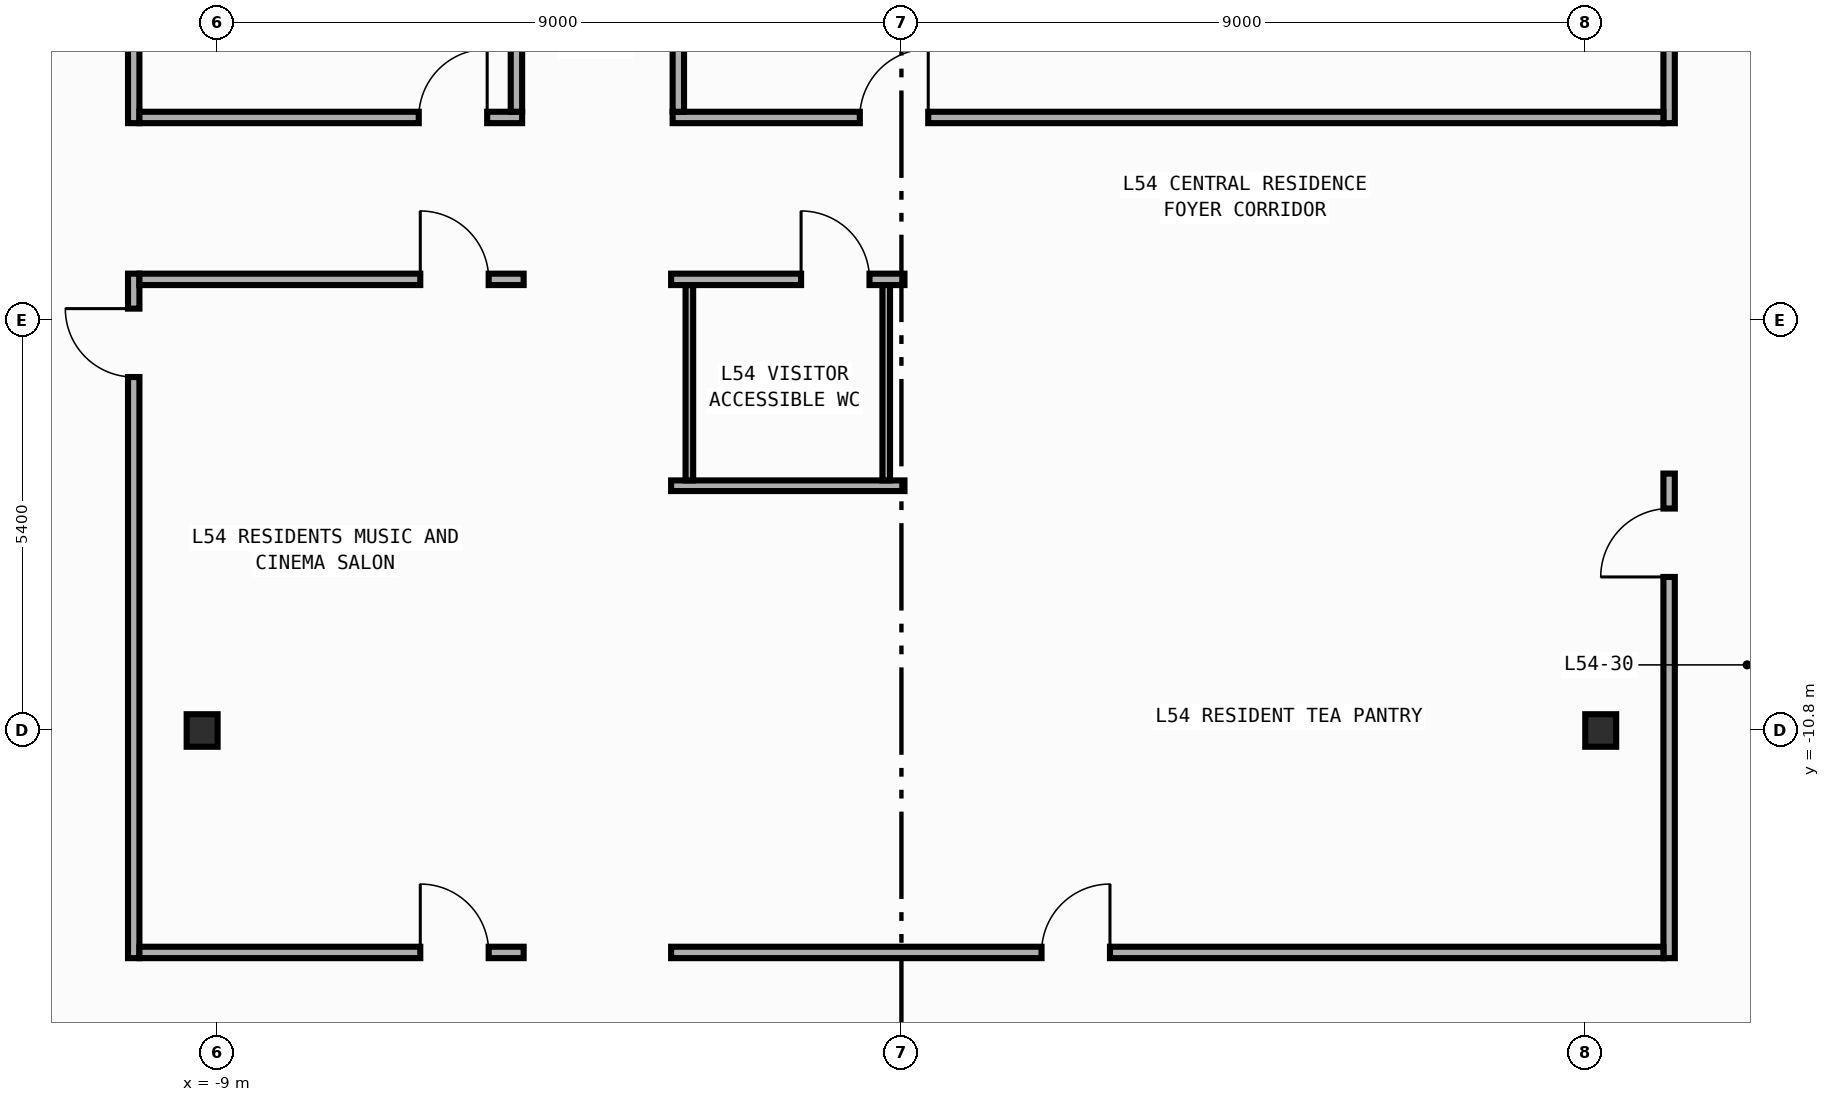
"""IFC4 building model, lengths in metres.
Left out: names, types, materials, properties, quantities, classifications, styles, units other than length and angle.
Written with IfcOpenShell. Run it as: python <this file> out.ifc"""

import sys

from ifc_helpers import new_model, si_unit, direction, frame, frame_2d, origin, origin_2d, place, context, subcontext, project, spatial, rectangle, i_section, extrude, element, fill, save


model = new_model("IFC4")
c1 = context("Model", 3, precision=1e-05, world=origin(), true_north=direction((0.0, 1.0)))
c2 = subcontext(c1, "Body", "Model", "MODEL_VIEW")
j1 = project(units=[si_unit("LENGTHUNIT", "METRE"), si_unit("PLANEANGLEUNIT", "RADIAN")], contexts=[c1])
p1 = place(None, origin())
s1 = spatial("IfcSite", under=j1, at=p1, CompositionType="ELEMENT")
p2 = place(p1, origin())
s2 = spatial("IfcBuilding", under=s1, at=p2, CompositionType="ELEMENT")
p3 = place(p2, frame((0.0, 0.0, 233.2)))
s3 = spatial("IfcBuildingStorey", under=s2, at=p3, CompositionType="ELEMENT", Elevation=233.2)
for number, where, z_axis, x_axis in (
    (1, (-9.2, -10.8, 0.0), (0.0, 0.0, 1.0), (1.0, 0.0, 0.0)),
    (2, (9.2, -10.8, 0.0), (0.0, 0.0, 1.0), (1.0, 0.0, 0.0)),
):
    element("IfcColumn", number, at=place(p3, frame(where, z_axis=z_axis, x_axis=x_axis)), inside=s3, PredefinedType="COLUMN", context=c2, shape_type="SweptSolid", body=[
        extrude(i_section(OverallWidth=0.407, OverallDepth=0.428, WebThickness=0.02, FlangeThickness=0.035, FilletRadius=0.022, at=origin_2d()), origin(), (0.0, 0.0, 1.0), 3.6),
    ])
p4 = place(p3, frame((-10.1, -2.81, 0.0), z_axis=(0.0, 0.0, 1.0), x_axis=(0.0, 1.0, 0.0)))
e3 = element("IfcWall", 3, at=p4, inside=s3, PredefinedType="PARTITIONING", context=c2, shape_type="SweptSolid", body=[
    extrude(rectangle(XDim=16.605, YDim=0.15, at=frame_2d((8.302, 0.0))), origin(), (0.0, 0.0, 1.0), 3.34),
])
p5 = place(p4, frame((7.751, 0.0, 0.0)))
e4 = element("IfcOpeningElement", 4, at=p5, cuts=e3, PredefinedType="OPENING", context=c2, shape_type="SweptSolid", body=[
    extrude(rectangle(XDim=0.9, YDim=2.15, at=frame_2d((0.45, 1.075))), frame((0.0, 0.085, 0.0), z_axis=(0.0, -1.0, 0.0), x_axis=(1.0, 0.0, 0.0)), (0.0, 0.0, 1.0), 0.17),
])
p6 = place(p3, frame((-10.1, -13.795, 0.0), z_axis=(0.0, 0.0, 1.0), x_axis=(0.0, 1.0, 0.0)))
e5 = element("IfcWall", 5, at=p6, inside=s3, PredefinedType="PARTITIONING", context=c2, shape_type="SweptSolid", body=[
    extrude(rectangle(XDim=9.005, YDim=0.15, at=frame_2d((4.502, 0.0))), origin(), (0.0, 0.0, 1.0), 3.34),
])
p7 = place(p6, frame((7.645, 0.0, 0.0)))
e6 = element("IfcOpeningElement", 6, at=p7, cuts=e5, PredefinedType="OPENING", context=c2, shape_type="SweptSolid", body=[
    extrude(rectangle(XDim=0.9, YDim=2.15, at=frame_2d((0.45, 1.075))), frame((0.0, 0.085, 0.0), z_axis=(0.0, -1.0, 0.0), x_axis=(1.0, 0.0, 0.0)), (0.0, 0.0, 1.0), 0.17),
])
p8 = place(p3, frame((10.1, -2.81, 0.0), z_axis=(0.0, 0.0, 1.0), x_axis=(0.0, 1.0, 0.0)))
e7 = element("IfcWall", 7, at=p8, inside=s3, PredefinedType="PARTITIONING", context=c2, shape_type="SweptSolid", body=[
    extrude(rectangle(XDim=16.605, YDim=0.15, at=frame_2d((8.302, 0.0))), origin(), (0.0, 0.0, 1.0), 3.34),
])
p9 = place(p8, frame((7.751, 0.0, 0.0)))
e8 = element("IfcOpeningElement", 8, at=p9, cuts=e7, PredefinedType="OPENING", context=c2, shape_type="SweptSolid", body=[
    extrude(rectangle(XDim=0.9, YDim=2.15, at=frame_2d((0.45, 1.075))), frame((0.0, 0.085, 0.0), z_axis=(0.0, -1.0, 0.0), x_axis=(1.0, 0.0, 0.0)), (0.0, 0.0, 1.0), 0.17),
])
p10 = place(p3, frame((10.1, -13.795, 0.0), z_axis=(0.0, 0.0, 1.0), x_axis=(0.0, 1.0, 0.0)))
e9 = element("IfcWall", 9, at=p10, inside=s3, PredefinedType="PARTITIONING", context=c2, shape_type="SweptSolid", body=[
    extrude(rectangle(XDim=6.375, YDim=0.15, at=frame_2d((3.188, 0.0))), origin(), (0.0, 0.0, 1.0), 3.34),
])
p11 = place(p10, frame((5.015, 0.0, 0.0)))
e10 = element("IfcOpeningElement", 10, at=p11, cuts=e9, PredefinedType="OPENING", context=c2, shape_type="SweptSolid", body=[
    extrude(rectangle(XDim=0.9, YDim=2.15, at=frame_2d((0.45, 1.075))), frame((0.0, 0.085, 0.0), z_axis=(0.0, -1.0, 0.0), x_axis=(1.0, 0.0, 0.0)), (0.0, 0.0, 1.0), 0.17),
])
p12 = place(p3, frame((-10.025, -2.735, 0.0), z_axis=(0.0, 0.0, 1.0), x_axis=(1.0, 0.0, 0.0)))
e11 = element("IfcWall", 11, at=p12, inside=s3, PredefinedType="PARTITIONING", context=c2, shape_type="SweptSolid", body=[
    extrude(rectangle(XDim=5.035, YDim=0.15, at=frame_2d((2.518, 0.0))), origin(), (0.0, 0.0, 1.0), 3.34),
])
p13 = place(p12, frame((3.675, 0.0, 0.0)))
e12 = element("IfcOpeningElement", 12, at=p13, cuts=e11, PredefinedType="OPENING", context=c2, shape_type="SweptSolid", body=[
    extrude(rectangle(XDim=0.9, YDim=2.15, at=frame_2d((0.45, 1.075))), frame((0.0, 0.085, 0.0), z_axis=(0.0, -1.0, 0.0), x_axis=(1.0, 0.0, 0.0)), (0.0, 0.0, 1.0), 0.17),
])
p14 = place(p3, frame((-10.025, -4.865, 0.0), z_axis=(0.0, 0.0, 1.0), x_axis=(1.0, 0.0, 0.0)))
e13 = element("IfcWall", 13, at=p14, inside=s3, PredefinedType="PARTITIONING", context=c2, shape_type="SweptSolid", body=[
    extrude(rectangle(XDim=5.055, YDim=0.15, at=frame_2d((2.527, 0.0))), origin(), (0.0, 0.0, 1.0), 3.34),
])
p15 = place(p14, frame((3.695, 0.0, 0.0)))
e14 = element("IfcOpeningElement", 14, at=p15, cuts=e13, PredefinedType="OPENING", context=c2, shape_type="SweptSolid", body=[
    extrude(rectangle(XDim=0.9, YDim=2.15, at=frame_2d((0.45, 1.075))), frame((0.0, 0.085, 0.0), z_axis=(0.0, -1.0, 0.0), x_axis=(1.0, 0.0, 0.0)), (0.0, 0.0, 1.0), 0.17),
])
p16 = place(p3, frame((-3.01, -2.735, 0.0), z_axis=(0.0, 0.0, 1.0), x_axis=(1.0, 0.0, 0.0)))
e15 = element("IfcWall", 15, at=p16, inside=s3, PredefinedType="PARTITIONING", context=c2, shape_type="SweptSolid", body=[
    extrude(rectangle(XDim=13.035, YDim=0.15, at=frame_2d((6.518, 0.0))), origin(), (0.0, 0.0, 1.0), 3.34),
])
p17 = place(p16, frame((2.463, 0.0, 0.0)))
e16 = element("IfcOpeningElement", 16, at=p17, cuts=e15, PredefinedType="OPENING", context=c2, shape_type="SweptSolid", body=[
    extrude(rectangle(XDim=0.9, YDim=2.15, at=frame_2d((0.45, 1.075))), frame((0.0, 0.085, 0.0), z_axis=(0.0, -1.0, 0.0), x_axis=(1.0, 0.0, 0.0)), (0.0, 0.0, 1.0), 0.17),
])
p18 = place(p3, frame((-3.03, -4.865, 0.0), z_axis=(0.0, 0.0, 1.0), x_axis=(1.0, 0.0, 0.0)))
e17 = element("IfcWall", 17, at=p18, inside=s3, PredefinedType="PARTITIONING", context=c2, shape_type="SweptSolid", body=[
    extrude(rectangle(XDim=3.07, YDim=0.15, at=frame_2d((1.535, 0.0))), origin(), (0.0, 0.0, 1.0), 3.34),
])
p19 = place(p18, frame((1.71, 0.0, 0.0)))
e18 = element("IfcOpeningElement", 18, at=p19, cuts=e17, PredefinedType="OPENING", context=c2, shape_type="SweptSolid", body=[
    extrude(rectangle(XDim=0.9, YDim=2.15, at=frame_2d((0.45, 1.075))), frame((0.0, 0.085, 0.0), z_axis=(0.0, -1.0, 0.0), x_axis=(1.0, 0.0, 0.0)), (0.0, 0.0, 1.0), 0.17),
])
p20 = place(p3, frame((-5.065, -2.66, 0.0), z_axis=(0.0, 0.0, 1.0), x_axis=(0.0, 1.0, 0.0)))
e19 = element("IfcWall", 19, at=p20, inside=s3, PredefinedType="PARTITIONING", context=c2, shape_type="SweptSolid", body=[
    extrude(rectangle(XDim=16.455, YDim=0.15, at=frame_2d((8.228, 0.0))), origin(), (0.0, 0.0, 1.0), 2.99),
])
p21 = place(p20, frame((7.677, 0.0, 0.0)))
e20 = element("IfcOpeningElement", 20, at=p21, cuts=e19, PredefinedType="OPENING", context=c2, shape_type="SweptSolid", body=[
    extrude(rectangle(XDim=0.9, YDim=2.15, at=frame_2d((0.45, 1.075))), frame((0.0, 0.085, 0.0), z_axis=(0.0, -1.0, 0.0), x_axis=(1.0, 0.0, 0.0)), (0.0, 0.0, 1.0), 0.17),
])
p22 = place(p3, frame((-2.935, -2.66, 0.0), z_axis=(0.0, 0.0, 1.0), x_axis=(0.0, 1.0, 0.0)))
e21 = element("IfcWall", 21, at=p22, inside=s3, PredefinedType="PARTITIONING", context=c2, shape_type="SweptSolid", body=[
    extrude(rectangle(XDim=16.455, YDim=0.15, at=frame_2d((8.228, 0.0))), origin(), (0.0, 0.0, 1.0), 3.34),
])
p23 = place(p22, frame((7.677, 0.0, 0.0)))
e22 = element("IfcOpeningElement", 22, at=p23, cuts=e21, PredefinedType="OPENING", context=c2, shape_type="SweptSolid", body=[
    extrude(rectangle(XDim=0.9, YDim=2.15, at=frame_2d((0.45, 1.075))), frame((0.0, 0.085, 0.0), z_axis=(0.0, -1.0, 0.0), x_axis=(1.0, 0.0, 0.0)), (0.0, 0.0, 1.0), 0.17),
])
p24 = place(p3, frame((-10.025, -13.72, 0.0), z_axis=(0.0, 0.0, 1.0), x_axis=(1.0, 0.0, 0.0)))
e23 = element("IfcWall", 23, at=p24, inside=s3, PredefinedType="PARTITIONING", context=c2, shape_type="SweptSolid", body=[
    extrude(rectangle(XDim=5.055, YDim=0.15, at=frame_2d((2.527, 0.0))), origin(), (0.0, 0.0, 1.0), 3.34),
])
p25 = place(p24, frame((3.695, 0.0, 0.0)))
e24 = element("IfcOpeningElement", 24, at=p25, cuts=e23, PredefinedType="OPENING", context=c2, shape_type="SweptSolid", body=[
    extrude(rectangle(XDim=0.9, YDim=2.15, at=frame_2d((0.45, 1.075))), frame((0.0, 0.085, 0.0), z_axis=(0.0, -1.0, 0.0), x_axis=(1.0, 0.0, 0.0)), (0.0, 0.0, 1.0), 0.17),
])
p26 = place(p3, frame((-3.03, -13.72, 0.0), z_axis=(0.0, 0.0, 1.0), x_axis=(1.0, 0.0, 0.0)))
e25 = element("IfcWall", 25, at=p26, inside=s3, PredefinedType="PARTITIONING", context=c2, shape_type="SweptSolid", body=[
    extrude(rectangle(XDim=13.055, YDim=0.15, at=frame_2d((6.527, 0.0))), origin(), (0.0, 0.0, 1.0), 3.34),
])
p27 = place(p26, frame((4.874, 0.0, 0.0)))
e26 = element("IfcOpeningElement", 26, at=p27, cuts=e25, PredefinedType="OPENING", context=c2, shape_type="SweptSolid", body=[
    extrude(rectangle(XDim=0.9, YDim=2.15, at=frame_2d((0.45, 1.075))), frame((0.0, 0.085, 0.0), z_axis=(0.0, -1.0, 0.0), x_axis=(1.0, 0.0, 0.0)), (0.0, 0.0, 1.0), 0.17),
])
p28 = place(p3, frame((-3.03, -7.58, 0.0), z_axis=(0.0, 0.0, 1.0), x_axis=(1.0, 0.0, 0.0)))
e27 = element("IfcWall", 27, at=p28, inside=s3, PredefinedType="PARTITIONING", context=c2, shape_type="SweptSolid", body=[
    extrude(rectangle(XDim=3.07, YDim=0.14, at=frame_2d((1.535, 0.0))), origin(), (0.0, 0.0, 1.0), 3.34),
])
for number, where, z_axis, x_axis in (
    (28, (-0.2, -4.94, 0.0), (0.0, 0.0, 1.0), (0.0, -1.0, 0.0)),
    (29, (-2.79, -7.51, 0.0), (0.0, 0.0, 1.0), (0.0, 1.0, 0.0)),
):
    element("IfcWall", number, at=place(p3, frame(where, z_axis=z_axis, x_axis=x_axis)), inside=s3, PredefinedType="PARTITIONING", context=c2, shape_type="SweptSolid", body=[
        extrude(rectangle(XDim=2.57, YDim=0.1, at=frame_2d((1.285, 0.0))), origin(), (0.0, 0.0, 1.0), 3.34),
    ])
p29 = place(p7, origin())
e30 = element("IfcDoor", 30, at=p29, inside=s3, OperationType="SINGLE_SWING_RIGHT", PredefinedType="DOOR", context=c2, shape_type="SweptSolid", body=[
    extrude(rectangle(XDim=0.9, YDim=2.15, at=frame_2d((0.45, 1.075))), frame((0.0, 0.025, 0.0), z_axis=(0.0, -1.0, 0.0), x_axis=(1.0, 0.0, 0.0)), (0.0, 0.0, 1.0), 0.05),
])
fill(e6, e30)
p30 = place(p11, origin())
e31 = element("IfcDoor", 31, at=p30, inside=s3, OperationType="SINGLE_SWING_LEFT", PredefinedType="DOOR", context=c2, shape_type="SweptSolid", body=[
    extrude(rectangle(XDim=0.9, YDim=2.15, at=frame_2d((0.45, 1.075))), frame((0.0, 0.025, 0.0), z_axis=(0.0, -1.0, 0.0), x_axis=(1.0, 0.0, 0.0)), (0.0, 0.0, 1.0), 0.05),
])
fill(e10, e31)
p31 = place(p13, origin())
e32 = element("IfcDoor", 32, at=p31, inside=s3, OperationType="SINGLE_SWING_RIGHT", PredefinedType="DOOR", context=c2, shape_type="SweptSolid", body=[
    extrude(rectangle(XDim=0.9, YDim=2.15, at=frame_2d((0.45, 1.075))), frame((0.0, 0.025, 0.0), z_axis=(0.0, -1.0, 0.0), x_axis=(1.0, 0.0, 0.0)), (0.0, 0.0, 1.0), 0.05),
])
fill(e12, e32)
p32 = place(p15, origin())
e33 = element("IfcDoor", 33, at=p32, inside=s3, OperationType="SINGLE_SWING_LEFT", PredefinedType="DOOR", context=c2, shape_type="SweptSolid", body=[
    extrude(rectangle(XDim=0.9, YDim=2.15, at=frame_2d((0.45, 1.075))), frame((0.0, 0.025, 0.0), z_axis=(0.0, -1.0, 0.0), x_axis=(1.0, 0.0, 0.0)), (0.0, 0.0, 1.0), 0.05),
])
fill(e14, e33)
p33 = place(p17, origin())
e34 = element("IfcDoor", 34, at=p33, inside=s3, OperationType="SINGLE_SWING_RIGHT", PredefinedType="DOOR", context=c2, shape_type="SweptSolid", body=[
    extrude(rectangle(XDim=0.9, YDim=2.15, at=frame_2d((0.45, 1.075))), frame((0.0, 0.025, 0.0), z_axis=(0.0, -1.0, 0.0), x_axis=(1.0, 0.0, 0.0)), (0.0, 0.0, 1.0), 0.05),
])
fill(e16, e34)
p34 = place(p19, origin())
e35 = element("IfcDoor", 35, at=p34, inside=s3, OperationType="SINGLE_SWING_LEFT", PredefinedType="DOOR", context=c2, shape_type="SweptSolid", body=[
    extrude(rectangle(XDim=0.9, YDim=2.15, at=frame_2d((0.45, 1.075))), frame((0.0, 0.025, 0.0), z_axis=(0.0, -1.0, 0.0), x_axis=(1.0, 0.0, 0.0)), (0.0, 0.0, 1.0), 0.05),
])
fill(e18, e35)
p35 = place(p25, origin())
e36 = element("IfcDoor", 36, at=p35, inside=s3, OperationType="SINGLE_SWING_LEFT", PredefinedType="DOOR", context=c2, shape_type="SweptSolid", body=[
    extrude(rectangle(XDim=0.9, YDim=2.15, at=frame_2d((0.45, 1.075))), frame((0.0, 0.025, 0.0), z_axis=(0.0, -1.0, 0.0), x_axis=(1.0, 0.0, 0.0)), (0.0, 0.0, 1.0), 0.05),
])
fill(e24, e36)
p36 = place(p27, origin())
e37 = element("IfcDoor", 37, at=p36, inside=s3, OperationType="SINGLE_SWING_RIGHT", PredefinedType="DOOR", context=c2, shape_type="SweptSolid", body=[
    extrude(rectangle(XDim=0.9, YDim=2.15, at=frame_2d((0.45, 1.075))), frame((0.0, 0.025, 0.0), z_axis=(0.0, -1.0, 0.0), x_axis=(1.0, 0.0, 0.0)), (0.0, 0.0, 1.0), 0.05),
])
fill(e26, e37)
save(model, sys.argv[1])
